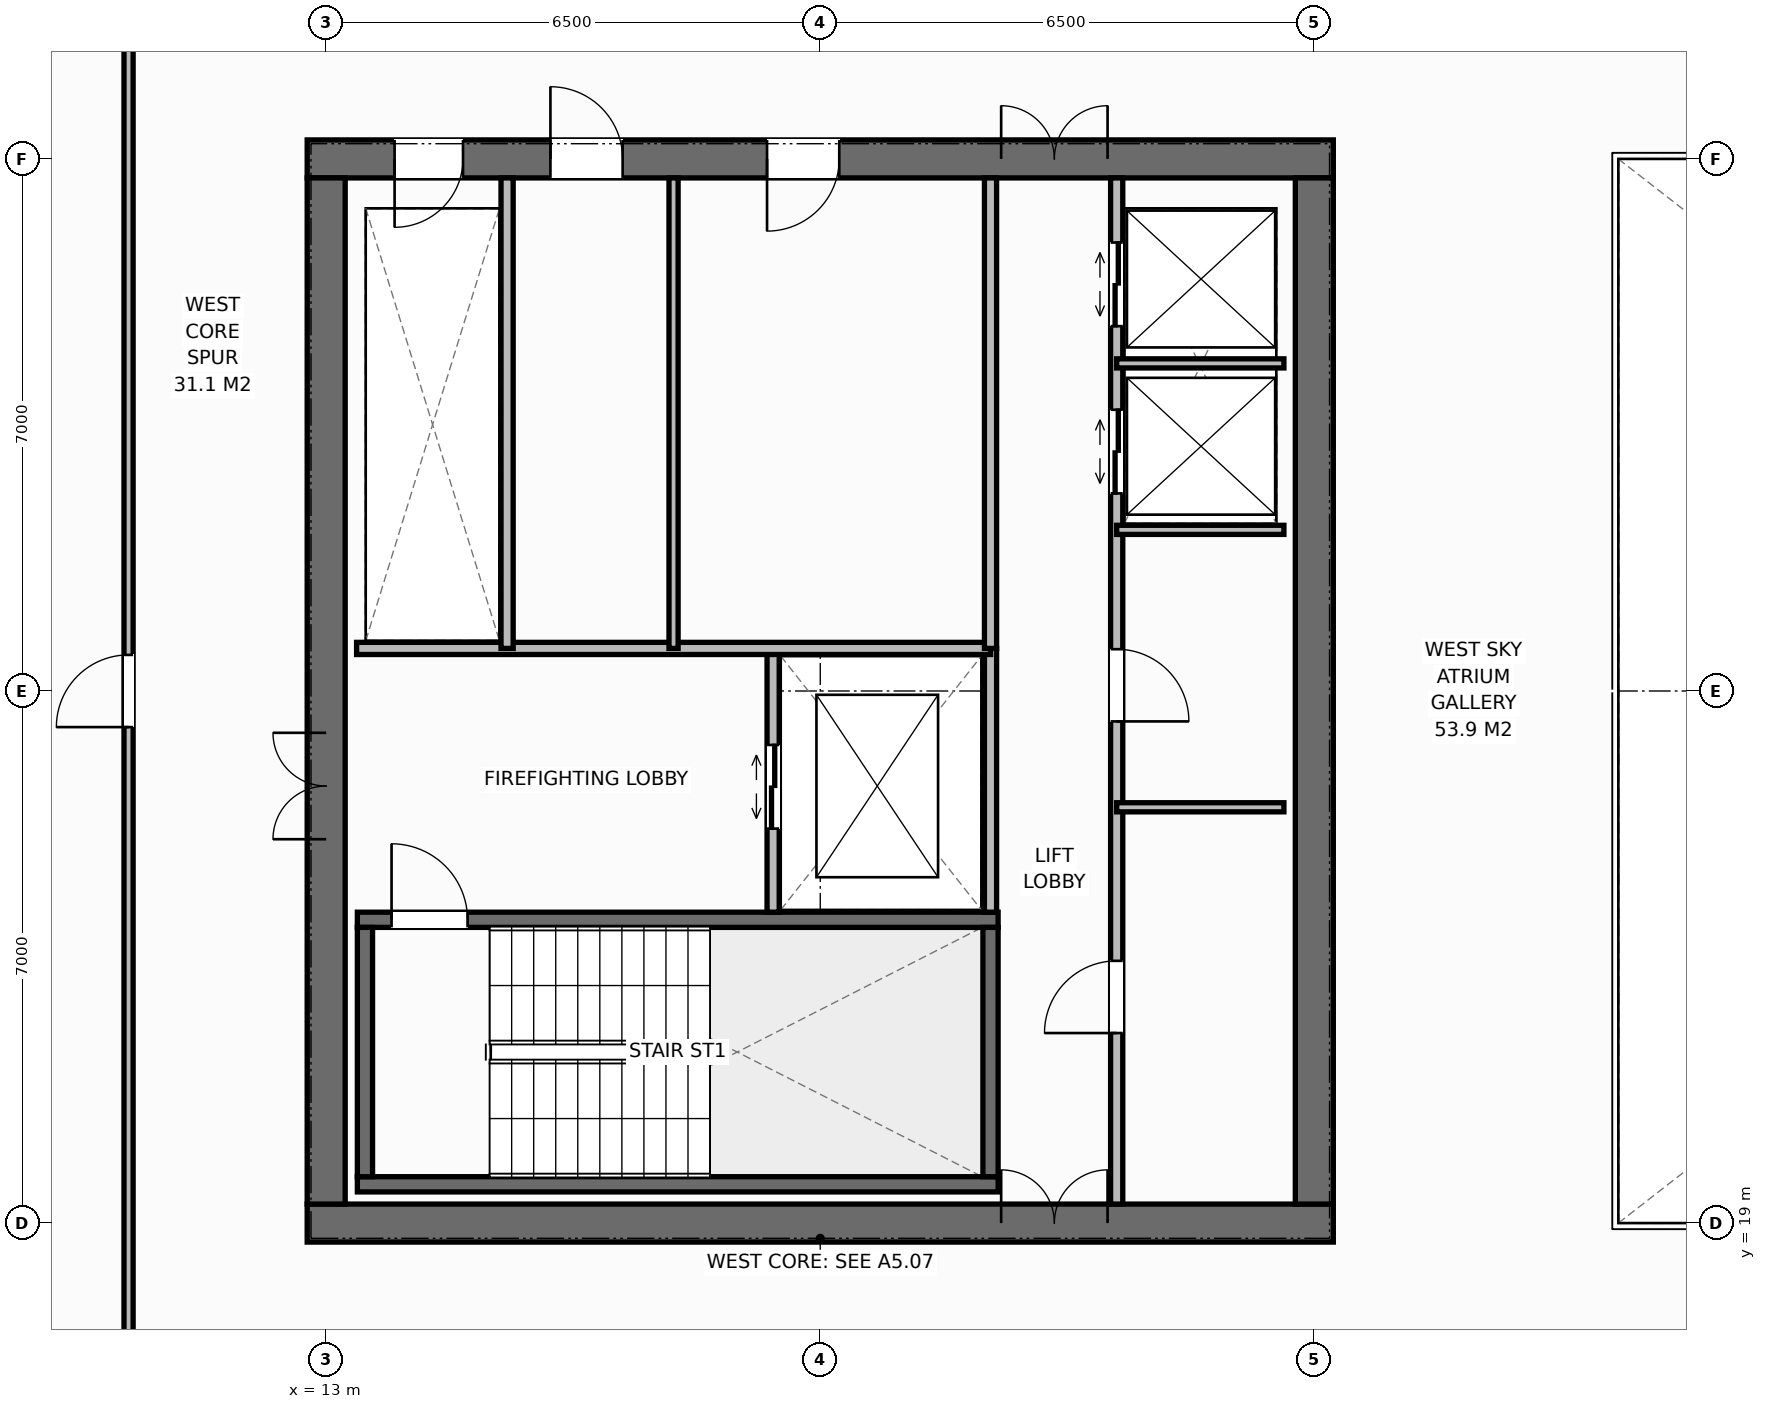
"""IFC4 building model, lengths in metres.
Left out: names, types, materials, properties, quantities, classifications, styles, units other than length and angle.
Written with IfcOpenShell. Run it as: python <this file> out.ifc"""

import sys

from ifc_helpers import new_model, si_unit, direction, frame, frame_2d, origin, place, context, subcontext, project, spatial, rectangle, extrude, element, fill, save


model = new_model("IFC4")
c1 = context("Model", 3, precision=1e-05, world=origin(), true_north=direction((0.0, 1.0)))
c2 = subcontext(c1, "Body", "Model", "MODEL_VIEW")
j1 = project(units=[si_unit("LENGTHUNIT", "METRE"), si_unit("PLANEANGLEUNIT", "RADIAN")], contexts=[c1])
p1 = place(None, origin())
s1 = spatial("IfcSite", under=j1, at=p1, CompositionType="ELEMENT")
p2 = place(p1, origin())
s2 = spatial("IfcBuilding", under=s1, at=p2, CompositionType="ELEMENT")
p3 = place(p2, frame((0.0, 0.0, 210.0)))
s3 = spatial("IfcBuildingStorey", under=s2, at=p3, CompositionType="ELEMENT", Elevation=210.0)
p4 = place(p3, frame((12.75, 19.0, 0.0), z_axis=(0.0, 0.0, 1.0), x_axis=(1.0, 0.0, 0.0)))
e1 = element("IfcWall", 1, at=p4, inside=s3, PredefinedType="SHEAR", context=c2, shape_type="SweptSolid", body=[
    extrude(rectangle(XDim=13.5, YDim=0.5, at=frame_2d((6.75, 0.0))), origin(), (0.0, 0.0, 1.0), 3.8),
])
p5 = place(p4, frame((9.13, 0.0, 0.0)))
e2 = element("IfcOpeningElement", 2, at=p5, cuts=e1, PredefinedType="OPENING", context=c2, shape_type="SweptSolid", body=[
    extrude(rectangle(XDim=1.4, YDim=2.2, at=frame_2d((0.7, 1.1))), frame((0.0, 0.26, 0.0), z_axis=(0.0, -1.0, 0.0), x_axis=(1.0, 0.0, 0.0)), (0.0, 0.0, 1.0), 0.52),
])
p6 = place(p3, frame((12.75, 33.0, 0.0), z_axis=(0.0, 0.0, 1.0), x_axis=(1.0, 0.0, 0.0)))
e3 = element("IfcWall", 3, at=p6, inside=s3, PredefinedType="SHEAR", context=c2, shape_type="SweptSolid", body=[
    extrude(rectangle(XDim=13.5, YDim=0.5, at=frame_2d((6.75, 0.0))), origin(), (0.0, 0.0, 1.0), 3.8),
])
p7 = place(p6, frame((1.15, 0.0, 0.0)))
e4 = element("IfcOpeningElement", 4, at=p7, cuts=e3, PredefinedType="OPENING", context=c2, shape_type="SweptSolid", body=[
    extrude(rectangle(XDim=0.9, YDim=2.15, at=frame_2d((0.45, 1.075))), frame((0.0, 0.26, 0.0), z_axis=(0.0, -1.0, 0.0), x_axis=(1.0, 0.0, 0.0)), (0.0, 0.0, 1.0), 0.52),
])
p8 = place(p6, frame((3.2, 0.0, 0.0)))
e5 = element("IfcOpeningElement", 5, at=p8, cuts=e3, PredefinedType="OPENING", context=c2, shape_type="SweptSolid", body=[
    extrude(rectangle(XDim=0.95, YDim=2.15, at=frame_2d((0.475, 1.075))), frame((0.0, 0.26, 0.0), z_axis=(0.0, -1.0, 0.0), x_axis=(1.0, 0.0, 0.0)), (0.0, 0.0, 1.0), 0.52),
])
p9 = place(p6, frame((6.05, 0.0, 0.0)))
e6 = element("IfcOpeningElement", 6, at=p9, cuts=e3, PredefinedType="OPENING", context=c2, shape_type="SweptSolid", body=[
    extrude(rectangle(XDim=0.95, YDim=2.15, at=frame_2d((0.475, 1.075))), frame((0.0, 0.26, 0.0), z_axis=(0.0, -1.0, 0.0), x_axis=(1.0, 0.0, 0.0)), (0.0, 0.0, 1.0), 0.52),
])
p10 = place(p6, frame((9.13, 0.0, 0.0)))
e7 = element("IfcOpeningElement", 7, at=p10, cuts=e3, PredefinedType="OPENING", context=c2, shape_type="SweptSolid", body=[
    extrude(rectangle(XDim=1.4, YDim=2.2, at=frame_2d((0.7, 1.1))), frame((0.0, 0.26, 0.0), z_axis=(0.0, -1.0, 0.0), x_axis=(1.0, 0.0, 0.0)), (0.0, 0.0, 1.0), 0.52),
])
p11 = place(p3, frame((13.0, 19.25, 0.0), z_axis=(0.0, 0.0, 1.0), x_axis=(0.0, 1.0, 0.0)))
e8 = element("IfcWall", 8, at=p11, inside=s3, PredefinedType="SHEAR", context=c2, shape_type="SweptSolid", body=[
    extrude(rectangle(XDim=13.5, YDim=0.5, at=frame_2d((6.75, 0.0))), origin(), (0.0, 0.0, 1.0), 3.8),
])
p12 = place(p11, frame((4.8, 0.0, 0.0)))
e9 = element("IfcOpeningElement", 9, at=p12, cuts=e8, PredefinedType="OPENING", context=c2, shape_type="SweptSolid", body=[
    extrude(rectangle(XDim=1.4, YDim=2.2, at=frame_2d((0.7, 1.1))), frame((0.0, 0.26, 0.0), z_axis=(0.0, -1.0, 0.0), x_axis=(1.0, 0.0, 0.0)), (0.0, 0.0, 1.0), 0.52),
])
p13 = place(p3, frame((26.0, 19.25, 0.0), z_axis=(0.0, 0.0, 1.0), x_axis=(0.0, 1.0, 0.0)))
e10 = element("IfcWall", 10, at=p13, inside=s3, PredefinedType="SHEAR", context=c2, shape_type="SweptSolid", body=[
    extrude(rectangle(XDim=13.5, YDim=0.5, at=frame_2d((6.75, 0.0))), origin(), (0.0, 0.0, 1.0), 3.8),
])
p14 = place(p3, frame((13.41, 19.51, 0.0), z_axis=(0.0, 0.0, 1.0), x_axis=(1.0, 0.0, 0.0)))
e11 = element("IfcWall", 11, at=p14, inside=s3, PredefinedType="SHEAR", context=c2, shape_type="SweptSolid", body=[
    extrude(rectangle(XDim=8.43, YDim=0.2, at=frame_2d((4.215, 0.0))), origin(), (0.0, 0.0, 1.0), 3.8),
])
p15 = place(p3, frame((13.41, 22.99, 0.0), z_axis=(0.0, 0.0, 1.0), x_axis=(1.0, 0.0, 0.0)))
e12 = element("IfcWall", 12, at=p15, inside=s3, PredefinedType="SHEAR", context=c2, shape_type="SweptSolid", body=[
    extrude(rectangle(XDim=8.43, YDim=0.2, at=frame_2d((4.215, 0.0))), origin(), (0.0, 0.0, 1.0), 3.8),
])
p16 = place(p15, frame((0.45, 0.0, 0.0)))
e13 = element("IfcOpeningElement", 13, at=p16, cuts=e12, PredefinedType="OPENING", context=c2, shape_type="SweptSolid", body=[
    extrude(rectangle(XDim=1.0, YDim=2.15, at=frame_2d((0.5, 1.075))), frame((0.0, 0.11, 0.0), z_axis=(0.0, -1.0, 0.0), x_axis=(1.0, 0.0, 0.0)), (0.0, 0.0, 1.0), 0.22),
])
for number, where, z_axis, x_axis in (
    (14, (13.51, 19.61, 0.0), (0.0, 0.0, 1.0), (0.0, 1.0, 0.0)),
    (15, (21.74, 19.61, 0.0), (0.0, 0.0, 1.0), (0.0, 1.0, 0.0)),
):
    element("IfcWall", number, at=place(p3, frame(where, z_axis=z_axis, x_axis=x_axis)), inside=s3, PredefinedType="SHEAR", context=c2, shape_type="SweptSolid", body=[
        extrude(rectangle(XDim=3.28, YDim=0.2, at=frame_2d((1.64, 0.0))), origin(), (0.0, 0.0, 1.0), 3.8),
    ])
p17 = place(p3, frame((21.74, 23.09, 0.0), z_axis=(0.0, 0.0, 1.0), x_axis=(0.0, 1.0, 0.0)))
e16 = element("IfcWall", 16, at=p17, inside=s3, PredefinedType="STANDARD", context=c2, shape_type="SweptSolid", body=[
    extrude(rectangle(XDim=3.47, YDim=0.16, at=frame_2d((1.735, 0.0))), origin(), (0.0, 0.0, 1.0), 3.58),
])
p18 = place(p3, frame((18.88, 23.09, 0.0), z_axis=(0.0, 0.0, 1.0), x_axis=(0.0, 1.0, 0.0)))
e17 = element("IfcWall", 17, at=p18, inside=s3, PredefinedType="STANDARD", context=c2, shape_type="SweptSolid", body=[
    extrude(rectangle(XDim=3.47, YDim=0.16, at=frame_2d((1.735, 0.0))), origin(), (0.0, 0.0, 1.0), 3.58),
])
p19 = place(p18, frame((1.1, 0.0, 0.0)))
e18 = element("IfcOpeningElement", 18, at=p19, cuts=e17, PredefinedType="OPENING", context=c2, shape_type="SweptSolid", body=[
    extrude(rectangle(XDim=1.1, YDim=2.2, at=frame_2d((0.55, 1.1))), frame((0.0, 0.09, 0.0), z_axis=(0.0, -1.0, 0.0), x_axis=(1.0, 0.0, 0.0)), (0.0, 0.0, 1.0), 0.18),
])
p20 = place(p3, frame((13.4, 26.56, 0.0), z_axis=(0.0, 0.0, 1.0), x_axis=(1.0, 0.0, 0.0)))
e19 = element("IfcWall", 19, at=p20, inside=s3, PredefinedType="STANDARD", context=c2, shape_type="SweptSolid", body=[
    extrude(rectangle(XDim=8.34, YDim=0.16, at=frame_2d((4.17, 0.0))), origin(), (0.0, 0.0, 1.0), 3.58),
])
p21 = place(p3, frame((15.38, 26.56, 0.0), z_axis=(0.0, 0.0, 1.0), x_axis=(0.0, 1.0, 0.0)))
e20 = element("IfcWall", 20, at=p21, inside=s3, PredefinedType="STANDARD", context=c2, shape_type="SweptSolid", body=[
    extrude(rectangle(XDim=6.19, YDim=0.16, at=frame_2d((3.095, 0.0))), origin(), (0.0, 0.0, 1.0), 3.58),
])
p22 = place(p3, frame((17.57, 26.56, 0.0), z_axis=(0.0, 0.0, 1.0), x_axis=(0.0, 1.0, 0.0)))
e21 = element("IfcWall", 21, at=p22, inside=s3, PredefinedType="PARTITIONING", context=c2, shape_type="SweptSolid", body=[
    extrude(rectangle(XDim=6.19, YDim=0.12, at=frame_2d((3.095, 0.0))), origin(), (0.0, 0.0, 1.0), 3.58),
])
p23 = place(p3, frame((21.74, 26.56, 0.0), z_axis=(0.0, 0.0, 1.0), x_axis=(0.0, 1.0, 0.0)))
e22 = element("IfcWall", 22, at=p23, inside=s3, PredefinedType="STANDARD", context=c2, shape_type="SweptSolid", body=[
    extrude(rectangle(XDim=6.19, YDim=0.16, at=frame_2d((3.095, 0.0))), origin(), (0.0, 0.0, 1.0), 3.58),
])
p24 = place(p3, frame((23.4, 19.25, 0.0), z_axis=(0.0, 0.0, 1.0), x_axis=(0.0, 1.0, 0.0)))
e23 = element("IfcWall", 23, at=p24, inside=s3, PredefinedType="STANDARD", context=c2, shape_type="SweptSolid", body=[
    extrude(rectangle(XDim=13.5, YDim=0.16, at=frame_2d((6.75, 0.0))), origin(), (0.0, 0.0, 1.0), 3.58),
])
p25 = place(p24, frame((2.25, 0.0, 0.0)))
e24 = element("IfcOpeningElement", 24, at=p25, cuts=e23, PredefinedType="OPENING", context=c2, shape_type="SweptSolid", body=[
    extrude(rectangle(XDim=0.95, YDim=2.15, at=frame_2d((0.475, 1.075))), frame((0.0, 0.09, 0.0), z_axis=(0.0, -1.0, 0.0), x_axis=(1.0, 0.0, 0.0)), (0.0, 0.0, 1.0), 0.18),
])
p26 = place(p24, frame((6.35, 0.0, 0.0)))
e25 = element("IfcOpeningElement", 25, at=p26, cuts=e23, PredefinedType="OPENING", context=c2, shape_type="SweptSolid", body=[
    extrude(rectangle(XDim=0.95, YDim=2.15, at=frame_2d((0.475, 1.075))), frame((0.0, 0.09, 0.0), z_axis=(0.0, -1.0, 0.0), x_axis=(1.0, 0.0, 0.0)), (0.0, 0.0, 1.0), 0.18),
])
p27 = place(p24, frame((9.35, 0.0, 0.0)))
e26 = element("IfcOpeningElement", 26, at=p27, cuts=e23, PredefinedType="OPENING", context=c2, shape_type="SweptSolid", body=[
    extrude(rectangle(XDim=1.1, YDim=2.2, at=frame_2d((0.55, 1.1))), frame((0.0, 0.09, 0.0), z_axis=(0.0, -1.0, 0.0), x_axis=(1.0, 0.0, 0.0)), (0.0, 0.0, 1.0), 0.18),
])
p28 = place(p24, frame((11.55, 0.0, 0.0)))
e27 = element("IfcOpeningElement", 27, at=p28, cuts=e23, PredefinedType="OPENING", context=c2, shape_type="SweptSolid", body=[
    extrude(rectangle(XDim=1.1, YDim=2.2, at=frame_2d((0.55, 1.1))), frame((0.0, 0.09, 0.0), z_axis=(0.0, -1.0, 0.0), x_axis=(1.0, 0.0, 0.0)), (0.0, 0.0, 1.0), 0.18),
])
for number, where, z_axis, x_axis in (
    (28, (23.4, 24.47, 0.0), (0.0, 0.0, 1.0), (1.0, 0.0, 0.0)),
    (29, (23.4, 28.12, 0.0), (0.0, 0.0, 1.0), (1.0, 0.0, 0.0)),
    (30, (23.4, 30.31, 0.0), (0.0, 0.0, 1.0), (1.0, 0.0, 0.0)),
):
    element("IfcWall", number, at=place(p3, frame(where, z_axis=z_axis, x_axis=x_axis)), inside=s3, PredefinedType="PARTITIONING", context=c2, shape_type="SweptSolid", body=[
        extrude(rectangle(XDim=2.2, YDim=0.12, at=frame_2d((1.1, 0.0))), origin(), (0.0, 0.0, 1.0), 3.58),
    ])
p29 = place(p3, frame((10.4, 16.5, 0.0), z_axis=(0.0, 0.0, 1.0), x_axis=(0.0, 1.0, 0.0)))
e31 = element("IfcWall", 31, at=p29, inside=s3, PredefinedType="PARTITIONING", context=c2, shape_type="SweptSolid", body=[
    extrude(rectangle(XDim=19.0, YDim=0.12, at=frame_2d((9.5, 0.0))), origin(), (0.0, 0.0, 1.0), 3.58),
])
p30 = place(p29, frame((9.025, 0.0, 0.0)))
e32 = element("IfcOpeningElement", 32, at=p30, cuts=e31, PredefinedType="OPENING", context=c2, shape_type="SweptSolid", body=[
    extrude(rectangle(XDim=0.95, YDim=2.15, at=frame_2d((0.475, 1.075))), frame((0.0, 0.07, 0.0), z_axis=(0.0, -1.0, 0.0), x_axis=(1.0, 0.0, 0.0)), (0.0, 0.0, 1.0), 0.14),
])
p31 = place(p16, origin())
e33 = element("IfcDoor", 33, at=p31, inside=s3, OperationType="SINGLE_SWING_LEFT", PredefinedType="DOOR", context=c2, shape_type="SweptSolid", body=[
    extrude(rectangle(XDim=1.0, YDim=2.15, at=frame_2d((0.5, 1.075))), frame((0.0, 0.025, 0.0), z_axis=(0.0, -1.0, 0.0), x_axis=(1.0, 0.0, 0.0)), (0.0, 0.0, 1.0), 0.05),
])
fill(e13, e33)
p32 = place(p12, origin())
e34 = element("IfcDoor", 34, at=p32, inside=s3, OperationType="DOUBLE_DOOR_SINGLE_SWING", PredefinedType="DOOR", context=c2, shape_type="SweptSolid", body=[
    extrude(rectangle(XDim=1.4, YDim=2.2, at=frame_2d((0.7, 1.1))), frame((0.0, 0.025, 0.0), z_axis=(0.0, -1.0, 0.0), x_axis=(1.0, 0.0, 0.0)), (0.0, 0.0, 1.0), 0.05),
])
fill(e9, e34)
p33 = place(p19, origin())
e35 = element("IfcDoor", 35, at=p33, inside=s3, OperationType="DOUBLE_DOOR_SLIDING", PredefinedType="DOOR", context=c2, shape_type="SweptSolid", body=[
    extrude(rectangle(XDim=1.1, YDim=2.2, at=frame_2d((0.55, 1.1))), frame((0.0, 0.025, 0.0), z_axis=(0.0, -1.0, 0.0), x_axis=(1.0, 0.0, 0.0)), (0.0, 0.0, 1.0), 0.05),
])
fill(e18, e35)
p34 = place(p7, origin())
e36 = element("IfcDoor", 36, at=p34, inside=s3, OperationType="SINGLE_SWING_RIGHT", PredefinedType="DOOR", context=c2, shape_type="SweptSolid", body=[
    extrude(rectangle(XDim=0.9, YDim=2.15, at=frame_2d((0.45, 1.075))), frame((0.0, -0.025, 0.0), z_axis=(0.0, -1.0, 0.0), x_axis=(1.0, 0.0, 0.0)), (0.0, 0.0, 1.0), 0.05),
])
fill(e4, e36)
p35 = place(p8, origin())
e37 = element("IfcDoor", 37, at=p35, inside=s3, OperationType="SINGLE_SWING_LEFT", PredefinedType="DOOR", context=c2, shape_type="SweptSolid", body=[
    extrude(rectangle(XDim=0.95, YDim=2.15, at=frame_2d((0.475, 1.075))), frame((0.0, -0.025, 0.0), z_axis=(0.0, -1.0, 0.0), x_axis=(1.0, 0.0, 0.0)), (0.0, 0.0, 1.0), 0.05),
])
fill(e5, e37)
p36 = place(p9, origin())
e38 = element("IfcDoor", 38, at=p36, inside=s3, OperationType="SINGLE_SWING_RIGHT", PredefinedType="DOOR", context=c2, shape_type="SweptSolid", body=[
    extrude(rectangle(XDim=0.95, YDim=2.15, at=frame_2d((0.475, 1.075))), frame((0.0, -0.025, 0.0), z_axis=(0.0, -1.0, 0.0), x_axis=(1.0, 0.0, 0.0)), (0.0, 0.0, 1.0), 0.05),
])
fill(e6, e38)
p37 = place(p5, origin())
e39 = element("IfcDoor", 39, at=p37, inside=s3, OperationType="DOUBLE_DOOR_SINGLE_SWING", PredefinedType="DOOR", context=c2, shape_type="SweptSolid", body=[
    extrude(rectangle(XDim=1.4, YDim=2.2, at=frame_2d((0.7, 1.1))), frame((0.0, 0.075, 0.0), z_axis=(0.0, -1.0, 0.0), x_axis=(1.0, 0.0, 0.0)), (0.0, 0.0, 1.0), 0.05),
])
fill(e2, e39)
p38 = place(p10, origin())
e40 = element("IfcDoor", 40, at=p38, inside=s3, OperationType="DOUBLE_DOOR_SINGLE_SWING", PredefinedType="DOOR", context=c2, shape_type="SweptSolid", body=[
    extrude(rectangle(XDim=1.4, YDim=2.2, at=frame_2d((0.7, 1.1))), frame((0.0, -0.025, 0.0), z_axis=(0.0, -1.0, 0.0), x_axis=(1.0, 0.0, 0.0)), (0.0, 0.0, 1.0), 0.05),
])
fill(e7, e40)
p39 = place(p25, origin())
e41 = element("IfcDoor", 41, at=p39, inside=s3, OperationType="SINGLE_SWING_LEFT", PredefinedType="DOOR", context=c2, shape_type="SweptSolid", body=[
    extrude(rectangle(XDim=0.95, YDim=2.15, at=frame_2d((0.475, 1.075))), frame((0.0, 0.025, 0.0), z_axis=(0.0, -1.0, 0.0), x_axis=(1.0, 0.0, 0.0)), (0.0, 0.0, 1.0), 0.05),
])
fill(e24, e41)
p40 = place(p26, origin())
e42 = element("IfcDoor", 42, at=p40, inside=s3, OperationType="SINGLE_SWING_RIGHT", PredefinedType="DOOR", context=c2, shape_type="SweptSolid", body=[
    extrude(rectangle(XDim=0.95, YDim=2.15, at=frame_2d((0.475, 1.075))), frame((0.0, 0.025, 0.0), z_axis=(0.0, -1.0, 0.0), x_axis=(1.0, 0.0, 0.0)), (0.0, 0.0, 1.0), 0.05),
])
fill(e25, e42)
p41 = place(p27, origin())
e43 = element("IfcDoor", 43, at=p41, inside=s3, OperationType="DOUBLE_DOOR_SLIDING", PredefinedType="DOOR", context=c2, shape_type="SweptSolid", body=[
    extrude(rectangle(XDim=1.1, YDim=2.2, at=frame_2d((0.55, 1.1))), frame((0.0, 0.025, 0.0), z_axis=(0.0, -1.0, 0.0), x_axis=(1.0, 0.0, 0.0)), (0.0, 0.0, 1.0), 0.05),
])
fill(e26, e43)
p42 = place(p28, origin())
e44 = element("IfcDoor", 44, at=p42, inside=s3, OperationType="DOUBLE_DOOR_SLIDING", PredefinedType="DOOR", context=c2, shape_type="SweptSolid", body=[
    extrude(rectangle(XDim=1.1, YDim=2.2, at=frame_2d((0.55, 1.1))), frame((0.0, 0.025, 0.0), z_axis=(0.0, -1.0, 0.0), x_axis=(1.0, 0.0, 0.0)), (0.0, 0.0, 1.0), 0.05),
])
fill(e27, e44)
p43 = place(p30, origin())
e45 = element("IfcDoor", 45, at=p43, inside=s3, OperationType="SINGLE_SWING_LEFT", PredefinedType="DOOR", context=c2, shape_type="SweptSolid", body=[
    extrude(rectangle(XDim=0.95, YDim=2.15, at=frame_2d((0.475, 1.075))), frame((0.0, 0.025, 0.0), z_axis=(0.0, -1.0, 0.0), x_axis=(1.0, 0.0, 0.0)), (0.0, 0.0, 1.0), 0.05),
])
fill(e32, e45)
save(model, sys.argv[1])
